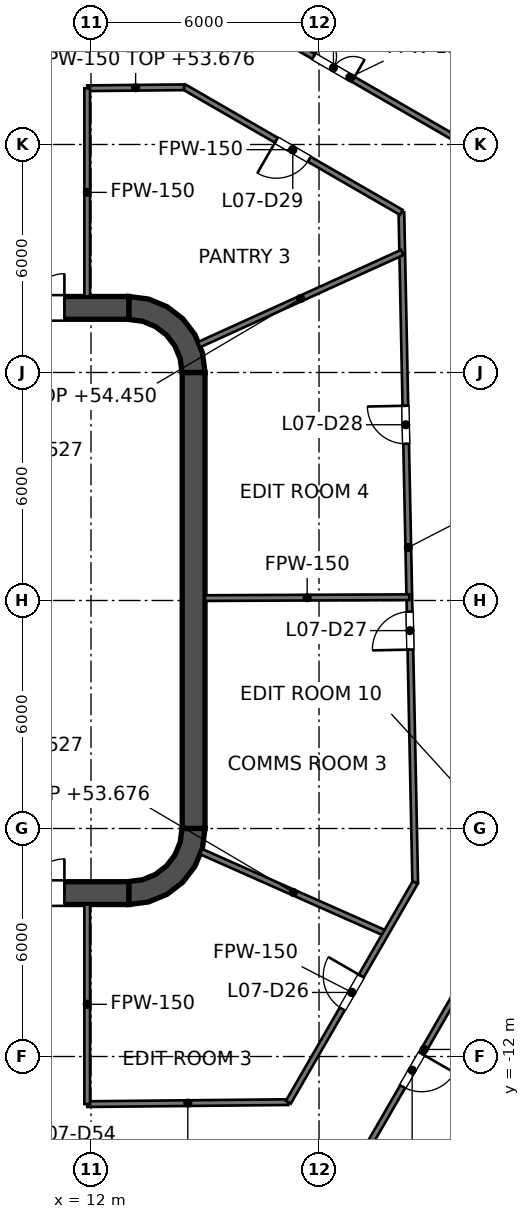
"""IFC4 building model, lengths in metres.
Left out: names, types, materials, properties, quantities, classifications, styles, units other than length and angle.
Written with IfcOpenShell. Run it as: python <this file> out.ifc"""

import sys

from ifc_helpers import new_model, si_unit, direction, frame, frame_2d, origin, place, context, subcontext, project, spatial, polyline, rectangle, outline, extrude, element, fill, save


model = new_model("IFC4")
c1 = context("Model", 3, precision=1e-05, world=origin(), true_north=direction((0.0, 1.0)))
c2 = subcontext(c1, "Body", "Model", "MODEL_VIEW")
j1 = project(units=[si_unit("LENGTHUNIT", "METRE"), si_unit("PLANEANGLEUNIT", "RADIAN")], contexts=[c1])
p1 = place(None, origin())
s1 = spatial("IfcSite", under=j1, at=p1, CompositionType="ELEMENT")
p2 = place(p1, origin())
s2 = spatial("IfcBuilding", under=s1, at=p2, CompositionType="ELEMENT")
p3 = place(p2, frame((0.0, 0.0, 50.4)))
s3 = spatial("IfcBuildingStorey", under=s2, at=p3, CompositionType="ELEMENT", Elevation=50.4)
p4 = place(p3, frame((-13.0, 7.7, 0.0), z_axis=(0.0, 0.0, 1.0), x_axis=(1.0, 0.0, 0.0)))
e1 = element("IfcWall", 1, at=p4, inside=s3, PredefinedType="SHEAR", context=c2, shape_type="SweptSolid", body=[
    extrude(rectangle(XDim=26.0, YDim=0.6, at=frame_2d((13.0, 0.0))), origin(), (0.0, 0.0, 1.0), 4.2),
])
p5 = place(p4, frame((1.7, 0.0, 0.0)))
e2 = element("IfcOpeningElement", 2, at=p5, cuts=e1, PredefinedType="OPENING", context=c2, shape_type="SweptSolid", body=[
    extrude(rectangle(XDim=1.8, YDim=2.1, at=frame_2d((0.9, 1.05))), frame((0.0, 0.3, 0.0), z_axis=(0.0, -1.0, 0.0), x_axis=(1.0, 0.0, 0.0)), (0.0, 0.0, 1.0), 0.6),
])
p6 = place(p4, frame((22.5, 0.0, 0.0)))
e3 = element("IfcOpeningElement", 3, at=p6, cuts=e1, PredefinedType="OPENING", context=c2, shape_type="SweptSolid", body=[
    extrude(rectangle(XDim=1.8, YDim=2.1, at=frame_2d((0.9, 1.05))), frame((0.0, 0.3, 0.0), z_axis=(0.0, -1.0, 0.0), x_axis=(1.0, 0.0, 0.0)), (0.0, 0.0, 1.0), 0.6),
])
p7 = place(p3, frame((-13.0, -7.7, 0.0), z_axis=(0.0, 0.0, 1.0), x_axis=(1.0, 0.0, 0.0)))
e4 = element("IfcWall", 4, at=p7, inside=s3, PredefinedType="SHEAR", context=c2, shape_type="SweptSolid", body=[
    extrude(rectangle(XDim=26.0, YDim=0.6, at=frame_2d((13.0, 0.0))), origin(), (0.0, 0.0, 1.0), 4.2),
])
p8 = place(p7, frame((1.7, 0.0, 0.0)))
e5 = element("IfcOpeningElement", 5, at=p8, cuts=e4, PredefinedType="OPENING", context=c2, shape_type="SweptSolid", body=[
    extrude(rectangle(XDim=1.8, YDim=2.1, at=frame_2d((0.9, 1.05))), frame((0.0, 0.3, 0.0), z_axis=(0.0, -1.0, 0.0), x_axis=(1.0, 0.0, 0.0)), (0.0, 0.0, 1.0), 0.6),
])
p9 = place(p7, frame((22.5, 0.0, 0.0)))
e6 = element("IfcOpeningElement", 6, at=p9, cuts=e4, PredefinedType="OPENING", context=c2, shape_type="SweptSolid", body=[
    extrude(rectangle(XDim=1.8, YDim=2.1, at=frame_2d((0.9, 1.05))), frame((0.0, 0.3, 0.0), z_axis=(0.0, -1.0, 0.0), x_axis=(1.0, 0.0, 0.0)), (0.0, 0.0, 1.0), 0.6),
])
p10 = place(p3, frame((14.7, -6.0, 0.0), z_axis=(0.0, 0.0, 1.0), x_axis=(0.0, 1.0, 0.0)))
e7 = element("IfcWall", 7, at=p10, inside=s3, PredefinedType="SHEAR", context=c2, shape_type="SweptSolid", body=[
    extrude(rectangle(XDim=12.0, YDim=0.6, at=frame_2d((6.0, 0.0))), origin(), (0.0, 0.0, 1.0), 4.2),
])
p11 = place(p3, origin())
e8 = element("IfcWall", 8, at=p11, inside=s3, PredefinedType="SHEAR", context=c2, shape_type="SweptSolid", body=[
    extrude(outline(polyline([(13.0, 8.0), (13.0, 7.395), (13.361, 7.347), (13.698, 7.208), (13.986, 6.986), (14.208, 6.698), (14.347, 6.361), (14.395, 6.0), (15.0, 6.0), (14.932, 6.518), (14.732, 7.0), (14.414, 7.414), (14.0, 7.732), (13.518, 7.932), (13.0, 8.0)])), origin(), (0.0, 0.0, 1.0), 4.2),
])
e9 = element("IfcWall", 9, at=p11, inside=s3, PredefinedType="SHEAR", context=c2, shape_type="SweptSolid", body=[
    extrude(outline(polyline([(15.0, -6.0), (14.395, -6.0), (14.347, -6.361), (14.208, -6.698), (13.986, -6.986), (13.698, -7.208), (13.361, -7.347), (13.0, -7.395), (13.0, -8.0), (13.518, -7.932), (14.0, -7.732), (14.414, -7.414), (14.732, -7.0), (14.932, -6.518), (15.0, -6.0)])), origin(), (0.0, 0.0, 1.0), 4.2),
])
p12 = place(p3, frame((11.8, -7.4, 0.0), z_axis=(0.0, 0.0, 1.0), x_axis=(0.0, 1.0, 0.0)))
e10 = element("IfcWall", 10, at=p12, inside=s3, PredefinedType="SOLIDWALL", context=c2, shape_type="SweptSolid", body=[
    extrude(rectangle(XDim=14.8, YDim=0.4, at=frame_2d((7.4, 0.0))), origin(), (0.0, 0.0, 1.0), 4.05),
])
p13 = place(p12, frame((11.2, 0.0, 0.0)))
e11 = element("IfcOpeningElement", 11, at=p13, cuts=e10, PredefinedType="OPENING", context=c2, shape_type="SweptSolid", body=[
    extrude(rectangle(XDim=1.1, YDim=2.1, at=frame_2d((0.55, 1.05))), frame((0.0, 0.2, 0.0), z_axis=(0.0, -1.0, 0.0), x_axis=(1.0, 0.0, 0.0)), (0.0, 0.0, 1.0), 0.4),
])
p14 = place(p12, frame((8.3, 0.0, 0.0)))
e12 = element("IfcOpeningElement", 12, at=p14, cuts=e10, PredefinedType="OPENING", context=c2, shape_type="SweptSolid", body=[
    extrude(rectangle(XDim=1.1, YDim=2.1, at=frame_2d((0.55, 1.05))), frame((0.0, 0.2, 0.0), z_axis=(0.0, -1.0, 0.0), x_axis=(1.0, 0.0, 0.0)), (0.0, 0.0, 1.0), 0.4),
])
p15 = place(p12, frame((5.4, 0.0, 0.0)))
e13 = element("IfcOpeningElement", 13, at=p15, cuts=e10, PredefinedType="OPENING", context=c2, shape_type="SweptSolid", body=[
    extrude(rectangle(XDim=1.1, YDim=2.1, at=frame_2d((0.55, 1.05))), frame((0.0, 0.2, 0.0), z_axis=(0.0, -1.0, 0.0), x_axis=(1.0, 0.0, 0.0)), (0.0, 0.0, 1.0), 0.4),
])
p16 = place(p12, frame((13.552, 0.0, 0.0)))
e14 = element("IfcOpeningElement", 14, at=p16, cuts=e10, PredefinedType="OPENING", context=c2, shape_type="SweptSolid", body=[
    extrude(rectangle(XDim=0.9, YDim=2.1, at=frame_2d((0.45, 1.05))), frame((0.0, 0.2, 0.0), z_axis=(0.0, -1.0, 0.0), x_axis=(1.0, 0.0, 0.0)), (0.0, 0.0, 1.0), 0.4),
])
p17 = place(p12, frame((0.347, 0.0, 0.0)))
e15 = element("IfcOpeningElement", 15, at=p17, cuts=e10, PredefinedType="OPENING", context=c2, shape_type="SweptSolid", body=[
    extrude(rectangle(XDim=0.9, YDim=2.1, at=frame_2d((0.45, 1.05))), frame((0.0, 0.2, 0.0), z_axis=(0.0, -1.0, 0.0), x_axis=(1.0, 0.0, 0.0)), (0.0, 0.0, 1.0), 0.4),
])
e16 = element("IfcWall", 16, at=p11, inside=s3, PredefinedType="SOLIDWALL", context=c2, shape_type="SweptSolid", body=[
    extrude(outline(polyline([(12.0, -5.675), (12.0, -5.925), (14.15, -5.925), (14.4, -5.925), (14.4, -5.675), (14.4, -3.025), (14.4, -2.775), (14.4, -0.125), (14.4, 0.125), (14.4, 2.775), (14.4, 3.025), (14.4, 5.675), (14.4, 5.925), (14.15, 5.925), (12.0, 5.925), (12.0, 5.675), (14.15, 5.675), (14.15, 3.025), (12.0, 3.025), (12.0, 2.775), (14.15, 2.775), (14.15, 0.125), (12.0, 0.125), (12.0, -0.125), (14.15, -0.125), (14.15, -2.775), (12.0, -2.775), (12.0, -3.025), (14.15, -3.025), (14.15, -5.675), (12.0, -5.675)])), origin(), (0.0, 0.0, 1.0), 4.05),
])
p18 = place(p3, frame((20.167, 10.213, 0.0), z_axis=(0.0, 0.0, 1.0), x_axis=(0.020624730832, -0.999787287616, 0.0)))
e17 = element("IfcWall", 17, at=p18, inside=s3, PredefinedType="PARTITIONING", context=c2, shape_type="SweptSolid", body=[
    extrude(rectangle(XDim=17.637, YDim=0.15, at=frame_2d((8.819, 0.0))), origin(), (0.0, 0.0, 1.0), 3.127),
])
p19 = place(p18, frame((10.508, 0.0, 0.0)))
e18 = element("IfcOpeningElement", 18, at=p19, cuts=e17, PredefinedType="OPENING", context=c2, shape_type="SweptSolid", body=[
    extrude(rectangle(XDim=1.0, YDim=2.1, at=frame_2d((0.5, 1.05))), frame((0.0, 0.075, 0.0), z_axis=(0.0, -1.0, 0.0), x_axis=(1.0, 0.0, 0.0)), (0.0, 0.0, 1.0), 0.15),
])
p20 = place(p18, frame((5.089, 0.0, 0.0)))
e19 = element("IfcOpeningElement", 19, at=p20, cuts=e17, PredefinedType="OPENING", context=c2, shape_type="SweptSolid", body=[
    extrude(rectangle(XDim=1.0, YDim=2.1, at=frame_2d((0.5, 1.05))), frame((0.0, 0.075, 0.0), z_axis=(0.0, -1.0, 0.0), x_axis=(1.0, 0.0, 0.0)), (0.0, 0.0, 1.0), 0.15),
])
p21 = place(p3, frame((14.448, 13.515, 0.0), z_axis=(0.0, 0.0, 1.0), x_axis=(0.86594975937, -0.500130997087, 0.0)))
e20 = element("IfcWall", 20, at=p21, inside=s3, PredefinedType="PARTITIONING", context=c2, shape_type="SweptSolid", body=[
    extrude(rectangle(XDim=6.604, YDim=0.15, at=frame_2d((3.302, 0.0))), origin(), (0.0, 0.0, 1.0), 3.195),
])
p22 = place(p21, frame((2.805, 0.0, 0.0)))
e21 = element("IfcOpeningElement", 21, at=p22, cuts=e20, PredefinedType="OPENING", context=c2, shape_type="SweptSolid", body=[
    extrude(rectangle(XDim=1.0, YDim=2.1, at=frame_2d((0.5, 1.05))), frame((0.0, 0.075, 0.0), z_axis=(0.0, -1.0, 0.0), x_axis=(1.0, 0.0, 0.0)), (0.0, 0.0, 1.0), 0.15),
])
p23 = place(p3, frame((15.08, 15.921, 0.0), z_axis=(0.0, 0.0, 1.0), x_axis=(0.865938192663, -0.500151023679, 0.0)))
e22 = element("IfcWall", 22, at=p23, inside=s3, PredefinedType="PARTITIONING", context=c2, shape_type="SweptSolid", body=[
    extrude(rectangle(XDim=8.613, YDim=0.15, at=frame_2d((4.306, 0.0))), origin(), (0.0, 0.0, 1.0), 3.195),
])
p24 = place(p23, frame((3.21, 0.0, 0.0)))
e23 = element("IfcOpeningElement", 23, at=p24, cuts=e22, PredefinedType="OPENING", context=c2, shape_type="SweptSolid", body=[
    extrude(rectangle(XDim=1.2, YDim=2.1, at=frame_2d((0.6, 1.05))), frame((0.0, 0.075, 0.0), z_axis=(0.0, -1.0, 0.0), x_axis=(1.0, 0.0, 0.0)), (0.0, 0.0, 1.0), 0.15),
])
p25 = place(p3, frame((14.895, -6.607, 0.0), z_axis=(0.0, 0.0, 1.0), x_axis=(0.914233271379, -0.405188259337, 0.0)))
e24 = element("IfcWall", 24, at=p25, inside=s3, PredefinedType="PARTITIONING", context=c2, shape_type="SweptSolid", body=[
    extrude(rectangle(XDim=5.317, YDim=0.15, at=frame_2d((2.659, 0.0))), origin(), (0.0, 0.0, 1.0), 3.276),
])
p26 = place(p3, frame((15.0, 0.063, 0.0), z_axis=(0.0, 0.0, 1.0), x_axis=(0.999990294223, 0.004405843865, 0.0)))
e25 = element("IfcWall", 25, at=p26, inside=s3, PredefinedType="PARTITIONING", context=c2, shape_type="SweptSolid", body=[
    extrude(rectangle(XDim=5.375, YDim=0.15, at=frame_2d((2.688, 0.0))), origin(), (0.0, 0.0, 1.0), 3.195),
])
p27 = place(p3, frame((11.9, -13.253, 0.0), z_axis=(0.0, 0.0, 1.0), x_axis=(0.999950853109, 0.009914200296, 0.0)))
e26 = element("IfcWall", 26, at=p27, inside=s3, PredefinedType="PARTITIONING", context=c2, shape_type="SweptSolid", body=[
    extrude(rectangle(XDim=5.294, YDim=0.15, at=frame_2d((2.647, 0.0))), origin(), (0.0, 0.0, 1.0), 3.276),
])
p28 = place(p3, frame((11.9, 13.48, 0.0), z_axis=(0.0, 0.0, 1.0), x_axis=(0.999950357576, 0.009964054536, 0.0)))
e27 = element("IfcWall", 27, at=p28, inside=s3, PredefinedType="PARTITIONING", context=c2, shape_type="SweptSolid", body=[
    extrude(rectangle(XDim=2.548, YDim=0.15, at=frame_2d((1.274, 0.0))), origin(), (0.0, 0.0, 1.0), 3.276),
])
p29 = place(p3, frame((14.843, 6.733, 0.0), z_axis=(0.0, 0.0, 1.0), x_axis=(0.910628361306, 0.413226315214, 0.0)))
e28 = element("IfcWall", 28, at=p29, inside=s3, PredefinedType="PARTITIONING", context=c2, shape_type="SweptSolid", body=[
    extrude(rectangle(XDim=5.87, YDim=0.15, at=frame_2d((2.935, 0.0))), origin(), (0.0, 0.0, 1.0), 4.05),
])
p30 = place(p3, frame((18.587, -15.587, 0.0), z_axis=(0.0, 0.0, 1.0), x_axis=(0.500026433136, 0.866010142069, 0.0)))
e29 = element("IfcWall", 29, at=p30, inside=s3, PredefinedType="PARTITIONING", context=c2, shape_type="SweptSolid", body=[
    extrude(rectangle(XDim=8.713, YDim=0.15, at=frame_2d((4.357, 0.0))), origin(), (0.0, 0.0, 1.0), 3.195),
])
p31 = place(p30, frame((3.226, 0.0, 0.0)))
e30 = element("IfcOpeningElement", 30, at=p31, cuts=e29, PredefinedType="OPENING", context=c2, shape_type="SweptSolid", body=[
    extrude(rectangle(XDim=1.0, YDim=2.1, at=frame_2d((0.5, 1.05))), frame((0.0, 0.075, 0.0), z_axis=(0.0, -1.0, 0.0), x_axis=(1.0, 0.0, 0.0)), (0.0, 0.0, 1.0), 0.15),
])
p32 = place(p3, frame((17.194, -13.201, 0.0), z_axis=(0.0, 0.0, 1.0), x_axis=(0.50001062018, 0.866019272134, 0.0)))
e31 = element("IfcWall", 31, at=p32, inside=s3, PredefinedType="PARTITIONING", context=c2, shape_type="SweptSolid", body=[
    extrude(rectangle(XDim=6.674, YDim=0.15, at=frame_2d((3.337, 0.0))), origin(), (0.0, 0.0, 1.0), 3.195),
])
p33 = place(p32, frame((2.833, 0.0, 0.0)))
e32 = element("IfcOpeningElement", 32, at=p33, cuts=e31, PredefinedType="OPENING", context=c2, shape_type="SweptSolid", body=[
    extrude(rectangle(XDim=1.0, YDim=2.1, at=frame_2d((0.5, 1.05))), frame((0.0, 0.075, 0.0), z_axis=(0.0, -1.0, 0.0), x_axis=(1.0, 0.0, 0.0)), (0.0, 0.0, 1.0), 0.15),
])
p34 = place(p3, frame((11.9, -13.253, 0.0), z_axis=(0.0, 0.0, 1.0), x_axis=(0.0, 1.0, 0.0)))
e33 = element("IfcWall", 33, at=p34, inside=s3, PredefinedType="PARTITIONING", context=c2, shape_type="SweptSolid", body=[
    extrude(rectangle(XDim=5.253, YDim=0.15, at=frame_2d((2.626, 0.0))), origin(), (0.0, 0.0, 1.0), 3.195),
])
p35 = place(p3, frame((11.9, 8.0, 0.0), z_axis=(0.0, 0.0, 1.0), x_axis=(0.0, 1.0, 0.0)))
e34 = element("IfcWall", 34, at=p35, inside=s3, PredefinedType="PARTITIONING", context=c2, shape_type="SweptSolid", body=[
    extrude(rectangle(XDim=5.479, YDim=0.15, at=frame_2d((2.74, 0.0))), origin(), (0.0, 0.0, 1.0), 3.195),
])
p36 = place(p13, origin())
e35 = element("IfcDoor", 35, at=p36, inside=s3, OperationType="DOUBLE_DOOR_SLIDING", PredefinedType="DOOR", context=c2, shape_type="SweptSolid", body=[
    extrude(rectangle(XDim=1.1, YDim=2.1, at=frame_2d((0.55, 1.05))), frame((0.0, 0.025, 0.0), z_axis=(0.0, -1.0, 0.0), x_axis=(1.0, 0.0, 0.0)), (0.0, 0.0, 1.0), 0.05),
])
fill(e11, e35)
p37 = place(p14, origin())
e36 = element("IfcDoor", 36, at=p37, inside=s3, OperationType="DOUBLE_DOOR_SLIDING", PredefinedType="DOOR", context=c2, shape_type="SweptSolid", body=[
    extrude(rectangle(XDim=1.1, YDim=2.1, at=frame_2d((0.55, 1.05))), frame((0.0, 0.025, 0.0), z_axis=(0.0, -1.0, 0.0), x_axis=(1.0, 0.0, 0.0)), (0.0, 0.0, 1.0), 0.05),
])
fill(e12, e36)
p38 = place(p15, origin())
e37 = element("IfcDoor", 37, at=p38, inside=s3, OperationType="DOUBLE_DOOR_SLIDING", PredefinedType="DOOR", context=c2, shape_type="SweptSolid", body=[
    extrude(rectangle(XDim=1.1, YDim=2.1, at=frame_2d((0.55, 1.05))), frame((0.0, 0.025, 0.0), z_axis=(0.0, -1.0, 0.0), x_axis=(1.0, 0.0, 0.0)), (0.0, 0.0, 1.0), 0.05),
])
fill(e13, e37)
p39 = place(p16, origin())
e38 = element("IfcDoor", 38, at=p39, inside=s3, OperationType="SINGLE_SWING_RIGHT", PredefinedType="DOOR", context=c2, shape_type="SweptSolid", body=[
    extrude(rectangle(XDim=0.9, YDim=2.1, at=frame_2d((0.45, 1.05))), frame((0.0, 0.025, 0.0), z_axis=(0.0, -1.0, 0.0), x_axis=(1.0, 0.0, 0.0)), (0.0, 0.0, 1.0), 0.05),
])
fill(e14, e38)
p40 = place(p17, origin())
e39 = element("IfcDoor", 39, at=p40, inside=s3, OperationType="SINGLE_SWING_RIGHT", PredefinedType="DOOR", context=c2, shape_type="SweptSolid", body=[
    extrude(rectangle(XDim=0.9, YDim=2.1, at=frame_2d((0.45, 1.05))), frame((0.0, 0.025, 0.0), z_axis=(0.0, -1.0, 0.0), x_axis=(1.0, 0.0, 0.0)), (0.0, 0.0, 1.0), 0.05),
])
fill(e15, e39)
p41 = place(p6, origin())
e40 = element("IfcDoor", 40, at=p41, inside=s3, OperationType="DOUBLE_DOOR_SINGLE_SWING", PredefinedType="DOOR", context=c2, shape_type="SweptSolid", body=[
    extrude(rectangle(XDim=1.8, YDim=2.1, at=frame_2d((0.9, 1.05))), frame((0.0, 0.025, 0.0), z_axis=(0.0, -1.0, 0.0), x_axis=(1.0, 0.0, 0.0)), (0.0, 0.0, 1.0), 0.05),
])
fill(e3, e40)
p42 = place(p9, origin())
e41 = element("IfcDoor", 41, at=p42, inside=s3, OperationType="DOUBLE_DOOR_SINGLE_SWING", PredefinedType="DOOR", context=c2, shape_type="SweptSolid", body=[
    extrude(rectangle(XDim=1.8, YDim=2.1, at=frame_2d((0.9, 1.05))), frame((0.0, 0.025, 0.0), z_axis=(0.0, -1.0, 0.0), x_axis=(1.0, 0.0, 0.0)), (0.0, 0.0, 1.0), 0.05),
])
fill(e6, e41)
p43 = place(p33, origin())
e42 = element("IfcDoor", 42, at=p43, inside=s3, OperationType="SINGLE_SWING_RIGHT", PredefinedType="DOOR", context=c2, shape_type="SweptSolid", body=[
    extrude(rectangle(XDim=1.0, YDim=2.1, at=frame_2d((0.5, 1.05))), frame((0.0, 0.025, 0.0), z_axis=(0.0, -1.0, 0.0), x_axis=(1.0, 0.0, 0.0)), (0.0, 0.0, 1.0), 0.05),
])
fill(e32, e42)
p44 = place(p19, origin())
e43 = element("IfcDoor", 43, at=p44, inside=s3, OperationType="SINGLE_SWING_RIGHT", PredefinedType="DOOR", context=c2, shape_type="SweptSolid", body=[
    extrude(rectangle(XDim=1.0, YDim=2.1, at=frame_2d((0.5, 1.05))), frame((0.0, 0.025, 0.0), z_axis=(0.0, -1.0, 0.0), x_axis=(1.0, 0.0, 0.0)), (0.0, 0.0, 1.0), 0.05),
])
fill(e18, e43)
p45 = place(p20, origin())
e44 = element("IfcDoor", 44, at=p45, inside=s3, OperationType="SINGLE_SWING_LEFT", PredefinedType="DOOR", context=c2, shape_type="SweptSolid", body=[
    extrude(rectangle(XDim=1.0, YDim=2.1, at=frame_2d((0.5, 1.05))), frame((0.0, 0.025, 0.0), z_axis=(0.0, -1.0, 0.0), x_axis=(1.0, 0.0, 0.0)), (0.0, 0.0, 1.0), 0.05),
])
fill(e19, e44)
p46 = place(p22, origin())
e45 = element("IfcDoor", 45, at=p46, inside=s3, OperationType="SINGLE_SWING_LEFT", PredefinedType="DOOR", context=c2, shape_type="SweptSolid", body=[
    extrude(rectangle(XDim=1.0, YDim=2.1, at=frame_2d((0.5, 1.05))), frame((0.0, 0.025, 0.0), z_axis=(0.0, -1.0, 0.0), x_axis=(1.0, 0.0, 0.0)), (0.0, 0.0, 1.0), 0.05),
])
fill(e21, e45)
p47 = place(p24, origin())
e46 = element("IfcDoor", 46, at=p47, inside=s3, OperationType="DOUBLE_DOOR_SINGLE_SWING", PredefinedType="DOOR", context=c2, shape_type="SweptSolid", body=[
    extrude(rectangle(XDim=1.2, YDim=2.1, at=frame_2d((0.6, 1.05))), frame((0.0, 0.025, 0.0), z_axis=(0.0, -1.0, 0.0), x_axis=(1.0, 0.0, 0.0)), (0.0, 0.0, 1.0), 0.05),
])
fill(e23, e46)
p48 = place(p31, origin())
e47 = element("IfcDoor", 47, at=p48, inside=s3, OperationType="SINGLE_SWING_RIGHT", PredefinedType="DOOR", context=c2, shape_type="SweptSolid", body=[
    extrude(rectangle(XDim=1.0, YDim=2.1, at=frame_2d((0.5, 1.05))), frame((0.0, 0.025, 0.0), z_axis=(0.0, -1.0, 0.0), x_axis=(1.0, 0.0, 0.0)), (0.0, 0.0, 1.0), 0.05),
])
fill(e30, e47)
save(model, sys.argv[1])
